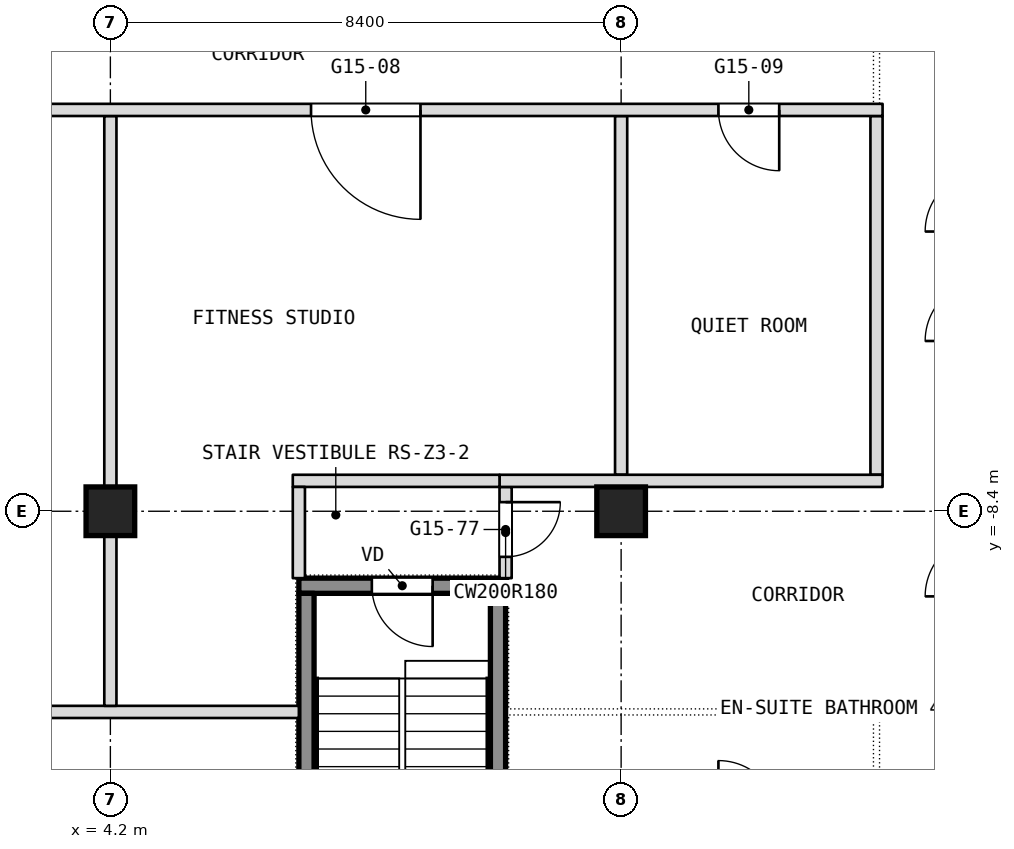
"""IFC4 building model, lengths in metres.
Left out: names, types, materials, properties, quantities, classifications, styles, units other than length and angle.
Written with IfcOpenShell. Run it as: python <this file> out.ifc"""

import sys

from ifc_helpers import new_model, si_unit, direction, frame, frame_2d, origin, origin_2d, place, context, subcontext, project, spatial, rectangle, extrude, element, fill, save


model = new_model("IFC4")
c1 = context("Model", 3, precision=1e-05, world=origin(), true_north=direction((0.0, 1.0)))
c2 = subcontext(c1, "Body", "Model", "MODEL_VIEW")
j1 = project(units=[si_unit("LENGTHUNIT", "METRE"), si_unit("PLANEANGLEUNIT", "RADIAN")], contexts=[c1])
p1 = place(None, origin())
s1 = spatial("IfcSite", under=j1, at=p1, CompositionType="ELEMENT")
p2 = place(p1, origin())
s2 = spatial("IfcBuilding", under=s1, at=p2, CompositionType="ELEMENT")
p3 = place(p2, frame((0.0, 0.0, 187.7)))
s3 = spatial("IfcBuildingStorey", under=s2, at=p3, CompositionType="ELEMENT", Elevation=187.7)
for number, where, z_axis, x_axis in (
    (1, (4.2, -8.4, 0.0), (0.0, 0.0, 1.0), (1.0, 0.0, 0.0)),
    (2, (12.6, -8.4, 0.0), (0.0, 0.0, 1.0), (1.0, 0.0, 0.0)),
):
    element("IfcColumn", number, at=place(p3, frame(where, z_axis=z_axis, x_axis=x_axis)), inside=s3, PredefinedType="COLUMN", context=c2, shape_type="SweptSolid", body=[
        extrude(rectangle(XDim=0.8, YDim=0.8, at=origin_2d()), origin(), (0.0, 0.0, 1.0), 3.6),
    ])
for number, where, z_axis, x_axis in (
    (3, (16.8, -7.8, 0.0), (0.0, 0.0, 1.0), (0.0, 1.0, 0.0)),
    (4, (12.6, -7.8, 0.0), (0.0, 0.0, 1.0), (0.0, 1.0, 0.0)),
):
    element("IfcWall", number, at=place(p3, frame(where, z_axis=z_axis, x_axis=x_axis)), inside=s3, PredefinedType="PARTITIONING", context=c2, shape_type="SweptSolid", body=[
        extrude(rectangle(XDim=5.9, YDim=0.2, at=frame_2d((2.95, 0.0))), origin(), (0.0, 0.0, 1.0), 3.34),
    ])
p4 = place(p3, frame((-7.3, -11.7, 0.0), z_axis=(0.0, 0.0, 1.0), x_axis=(1.0, 0.0, 0.0)))
e5 = element("IfcWall", 5, at=p4, inside=s3, PredefinedType="PARTITIONING", context=c2, shape_type="SweptSolid", body=[
    extrude(rectangle(XDim=14.6, YDim=0.2, at=frame_2d((7.3, 0.0))), origin(), (0.0, 0.0, 1.0), 3.34),
])
p5 = place(p3, frame((10.7, -9.5, 0.0), z_axis=(0.0, 0.0, 1.0), x_axis=(0.0, 1.0, 0.0)))
e6 = element("IfcWall", 6, at=p5, inside=s3, PredefinedType="PARTITIONING", context=c2, shape_type="SweptSolid", body=[
    extrude(rectangle(XDim=1.5, YDim=0.2, at=frame_2d((0.75, 0.0))), origin(), (0.0, 0.0, 1.0), 3.34),
])
p6 = place(p5, frame((0.35, 0.0, 0.0)))
e7 = element("IfcOpeningElement", 7, at=p6, cuts=e6, PredefinedType="OPENING", context=c2, shape_type="SweptSolid", body=[
    extrude(rectangle(XDim=0.9, YDim=2.1, at=frame_2d((0.45, 1.05))), frame((0.0, 0.1, 0.0), z_axis=(0.0, -1.0, 0.0), x_axis=(1.0, 0.0, 0.0)), (0.0, 0.0, 1.0), 0.2),
])
p7 = place(p3, frame((10.6, -7.9, 0.0), z_axis=(0.0, 0.0, 1.0), x_axis=(1.0, 0.0, 0.0)))
e8 = element("IfcWall", 8, at=p7, inside=s3, PredefinedType="PARTITIONING", context=c2, shape_type="SweptSolid", body=[
    extrude(rectangle(XDim=6.3, YDim=0.2, at=frame_2d((3.15, 0.0))), origin(), (0.0, 0.0, 1.0), 3.34),
])
p8 = place(p3, frame((7.2, -7.9, 0.0), z_axis=(0.0, 0.0, 1.0), x_axis=(1.0, 0.0, 0.0)))
e9 = element("IfcWall", 9, at=p8, inside=s3, PredefinedType="PARTITIONING", context=c2, shape_type="SweptSolid", body=[
    extrude(rectangle(XDim=3.4, YDim=0.2, at=frame_2d((1.7, 0.0))), origin(), (0.0, 0.0, 1.0), 3.34),
])
p9 = place(p3, frame((7.3, -9.5, 0.0), z_axis=(0.0, 0.0, 1.0), x_axis=(0.0, 1.0, 0.0)))
e10 = element("IfcWall", 10, at=p9, inside=s3, PredefinedType="PARTITIONING", context=c2, shape_type="SweptSolid", body=[
    extrude(rectangle(XDim=1.5, YDim=0.2, at=frame_2d((0.75, 0.0))), origin(), (0.0, 0.0, 1.0), 3.34),
])
p10 = place(p3, frame((4.2, -11.6, 0.0), z_axis=(0.0, 0.0, 1.0), x_axis=(0.0, 1.0, 0.0)))
e11 = element("IfcWall", 11, at=p10, inside=s3, PredefinedType="PARTITIONING", context=c2, shape_type="SweptSolid", body=[
    extrude(rectangle(XDim=9.7, YDim=0.2, at=frame_2d((4.85, 0.0))), origin(), (0.0, 0.0, 1.0), 3.34),
])
p11 = place(p3, frame((-16.9, -1.8, 0.0), z_axis=(0.0, 0.0, 1.0), x_axis=(1.0, 0.0, 0.0)))
e12 = element("IfcWall", 12, at=p11, inside=s3, PredefinedType="PARTITIONING", context=c2, shape_type="SweptSolid", body=[
    extrude(rectangle(XDim=33.8, YDim=0.2, at=frame_2d((16.9, 0.0))), origin(), (0.0, 0.0, 1.0), 3.34),
])
p12 = place(p11, frame((1.7, 0.0, 0.0)))
e13 = element("IfcOpeningElement", 13, at=p12, cuts=e12, PredefinedType="OPENING", context=c2, shape_type="SweptSolid", body=[
    extrude(rectangle(XDim=1.0, YDim=2.1, at=frame_2d((0.5, 1.05))), frame((0.0, 0.1, 0.0), z_axis=(0.0, -1.0, 0.0), x_axis=(1.0, 0.0, 0.0)), (0.0, 0.0, 1.0), 0.2),
])
p13 = place(p11, frame((5.9, 0.0, 0.0)))
e14 = element("IfcOpeningElement", 14, at=p13, cuts=e12, PredefinedType="OPENING", context=c2, shape_type="SweptSolid", body=[
    extrude(rectangle(XDim=1.0, YDim=2.1, at=frame_2d((0.5, 1.05))), frame((0.0, 0.1, 0.0), z_axis=(0.0, -1.0, 0.0), x_axis=(1.0, 0.0, 0.0)), (0.0, 0.0, 1.0), 0.2),
])
p14 = place(p11, frame((10.1, 0.0, 0.0)))
e15 = element("IfcOpeningElement", 15, at=p14, cuts=e12, PredefinedType="OPENING", context=c2, shape_type="SweptSolid", body=[
    extrude(rectangle(XDim=1.0, YDim=2.1, at=frame_2d((0.5, 1.05))), frame((0.0, 0.1, 0.0), z_axis=(0.0, -1.0, 0.0), x_axis=(1.0, 0.0, 0.0)), (0.0, 0.0, 1.0), 0.2),
])
p15 = place(p11, frame((14.3, 0.0, 0.0)))
e16 = element("IfcOpeningElement", 16, at=p15, cuts=e12, PredefinedType="OPENING", context=c2, shape_type="SweptSolid", body=[
    extrude(rectangle(XDim=1.0, YDim=2.1, at=frame_2d((0.5, 1.05))), frame((0.0, 0.1, 0.0), z_axis=(0.0, -1.0, 0.0), x_axis=(1.0, 0.0, 0.0)), (0.0, 0.0, 1.0), 0.2),
])
p16 = place(p11, frame((18.5, 0.0, 0.0)))
e17 = element("IfcOpeningElement", 17, at=p16, cuts=e12, PredefinedType="OPENING", context=c2, shape_type="SweptSolid", body=[
    extrude(rectangle(XDim=1.0, YDim=2.1, at=frame_2d((0.5, 1.05))), frame((0.0, 0.1, 0.0), z_axis=(0.0, -1.0, 0.0), x_axis=(1.0, 0.0, 0.0)), (0.0, 0.0, 1.0), 0.2),
])
p17 = place(p11, frame((24.4, 0.0, 0.0)))
e18 = element("IfcOpeningElement", 18, at=p17, cuts=e12, PredefinedType="OPENING", context=c2, shape_type="SweptSolid", body=[
    extrude(rectangle(XDim=1.8, YDim=2.1, at=frame_2d((0.9, 1.05))), frame((0.0, 0.1, 0.0), z_axis=(0.0, -1.0, 0.0), x_axis=(1.0, 0.0, 0.0)), (0.0, 0.0, 1.0), 0.2),
])
p18 = place(p11, frame((31.1, 0.0, 0.0)))
e19 = element("IfcOpeningElement", 19, at=p18, cuts=e12, PredefinedType="OPENING", context=c2, shape_type="SweptSolid", body=[
    extrude(rectangle(XDim=1.0, YDim=2.1, at=frame_2d((0.5, 1.05))), frame((0.0, 0.1, 0.0), z_axis=(0.0, -1.0, 0.0), x_axis=(1.0, 0.0, 0.0)), (0.0, 0.0, 1.0), 0.2),
])
p19 = place(p3, frame((7.3, -9.625, 0.1), z_axis=(0.0, 0.0, 1.0), x_axis=(1.0, 0.0, 0.0)))
e20 = element("IfcWall", 20, at=p19, inside=s3, PredefinedType="SHEAR", context=c2, shape_type="SweptSolid", body=[
    extrude(rectangle(XDim=3.4, YDim=0.25, at=frame_2d((1.7, 0.0))), origin(), (0.0, 0.0, 1.0), 3.6),
])
p20 = place(p19, frame((1.2, 0.0, 0.0)))
e21 = element("IfcOpeningElement", 21, at=p20, cuts=e20, PredefinedType="OPENING", context=c2, shape_type="SweptSolid", body=[
    extrude(rectangle(XDim=1.0, YDim=2.1, at=frame_2d((0.5, 1.05))), frame((0.0, 0.125, 0.0), z_axis=(0.0, -1.0, 0.0), x_axis=(1.0, 0.0, 0.0)), (0.0, 0.0, 1.0), 0.25),
])
for number, where, z_axis, x_axis in (
    (22, (7.425, -15.45, 0.1), (0.0, 0.0, 1.0), (0.0, 1.0, 0.0)),
    (23, (10.575, -15.45, 0.1), (0.0, 0.0, 1.0), (0.0, 1.0, 0.0)),
):
    element("IfcWall", number, at=place(p3, frame(where, z_axis=z_axis, x_axis=x_axis)), inside=s3, PredefinedType="SHEAR", context=c2, shape_type="SweptSolid", body=[
        extrude(rectangle(XDim=5.7, YDim=0.25, at=frame_2d((2.85, 0.0))), origin(), (0.0, 0.0, 1.0), 3.6),
    ])
p21 = place(p6, origin())
e24 = element("IfcDoor", 24, at=p21, inside=s3, OperationType="SINGLE_SWING_RIGHT", PredefinedType="DOOR", context=c2, shape_type="SweptSolid", body=[
    extrude(rectangle(XDim=0.9, YDim=2.1, at=frame_2d((0.45, 1.05))), frame((0.0, 0.025, 0.0), z_axis=(0.0, -1.0, 0.0), x_axis=(1.0, 0.0, 0.0)), (0.0, 0.0, 1.0), 0.05),
])
fill(e7, e24)
p22 = place(p17, origin())
e25 = element("IfcDoor", 25, at=p22, inside=s3, OperationType="DOUBLE_DOOR_SINGLE_SWING", PredefinedType="DOOR", context=c2, shape_type="SweptSolid", body=[
    extrude(rectangle(XDim=1.8, YDim=2.1, at=frame_2d((0.9, 1.05))), frame((0.0, 0.025, 0.0), z_axis=(0.0, -1.0, 0.0), x_axis=(1.0, 0.0, 0.0)), (0.0, 0.0, 1.0), 0.05),
])
fill(e18, e25)
p23 = place(p18, origin())
e26 = element("IfcDoor", 26, at=p23, inside=s3, OperationType="SINGLE_SWING_RIGHT", PredefinedType="DOOR", context=c2, shape_type="SweptSolid", body=[
    extrude(rectangle(XDim=1.0, YDim=2.1, at=frame_2d((0.5, 1.05))), frame((0.0, 0.025, 0.0), z_axis=(0.0, -1.0, 0.0), x_axis=(1.0, 0.0, 0.0)), (0.0, 0.0, 1.0), 0.05),
])
fill(e19, e26)
p24 = place(p20, origin())
e27 = element("IfcDoor", 27, at=p24, inside=s3, OperationType="SINGLE_SWING_LEFT", PredefinedType="DOOR", context=c2, shape_type="SweptSolid", body=[
    extrude(rectangle(XDim=1.0, YDim=2.1, at=frame_2d((0.5, 1.05))), frame((0.0, 0.025, 0.0), z_axis=(0.0, -1.0, 0.0), x_axis=(1.0, 0.0, 0.0)), (0.0, 0.0, 1.0), 0.05),
])
fill(e21, e27)
save(model, sys.argv[1])
